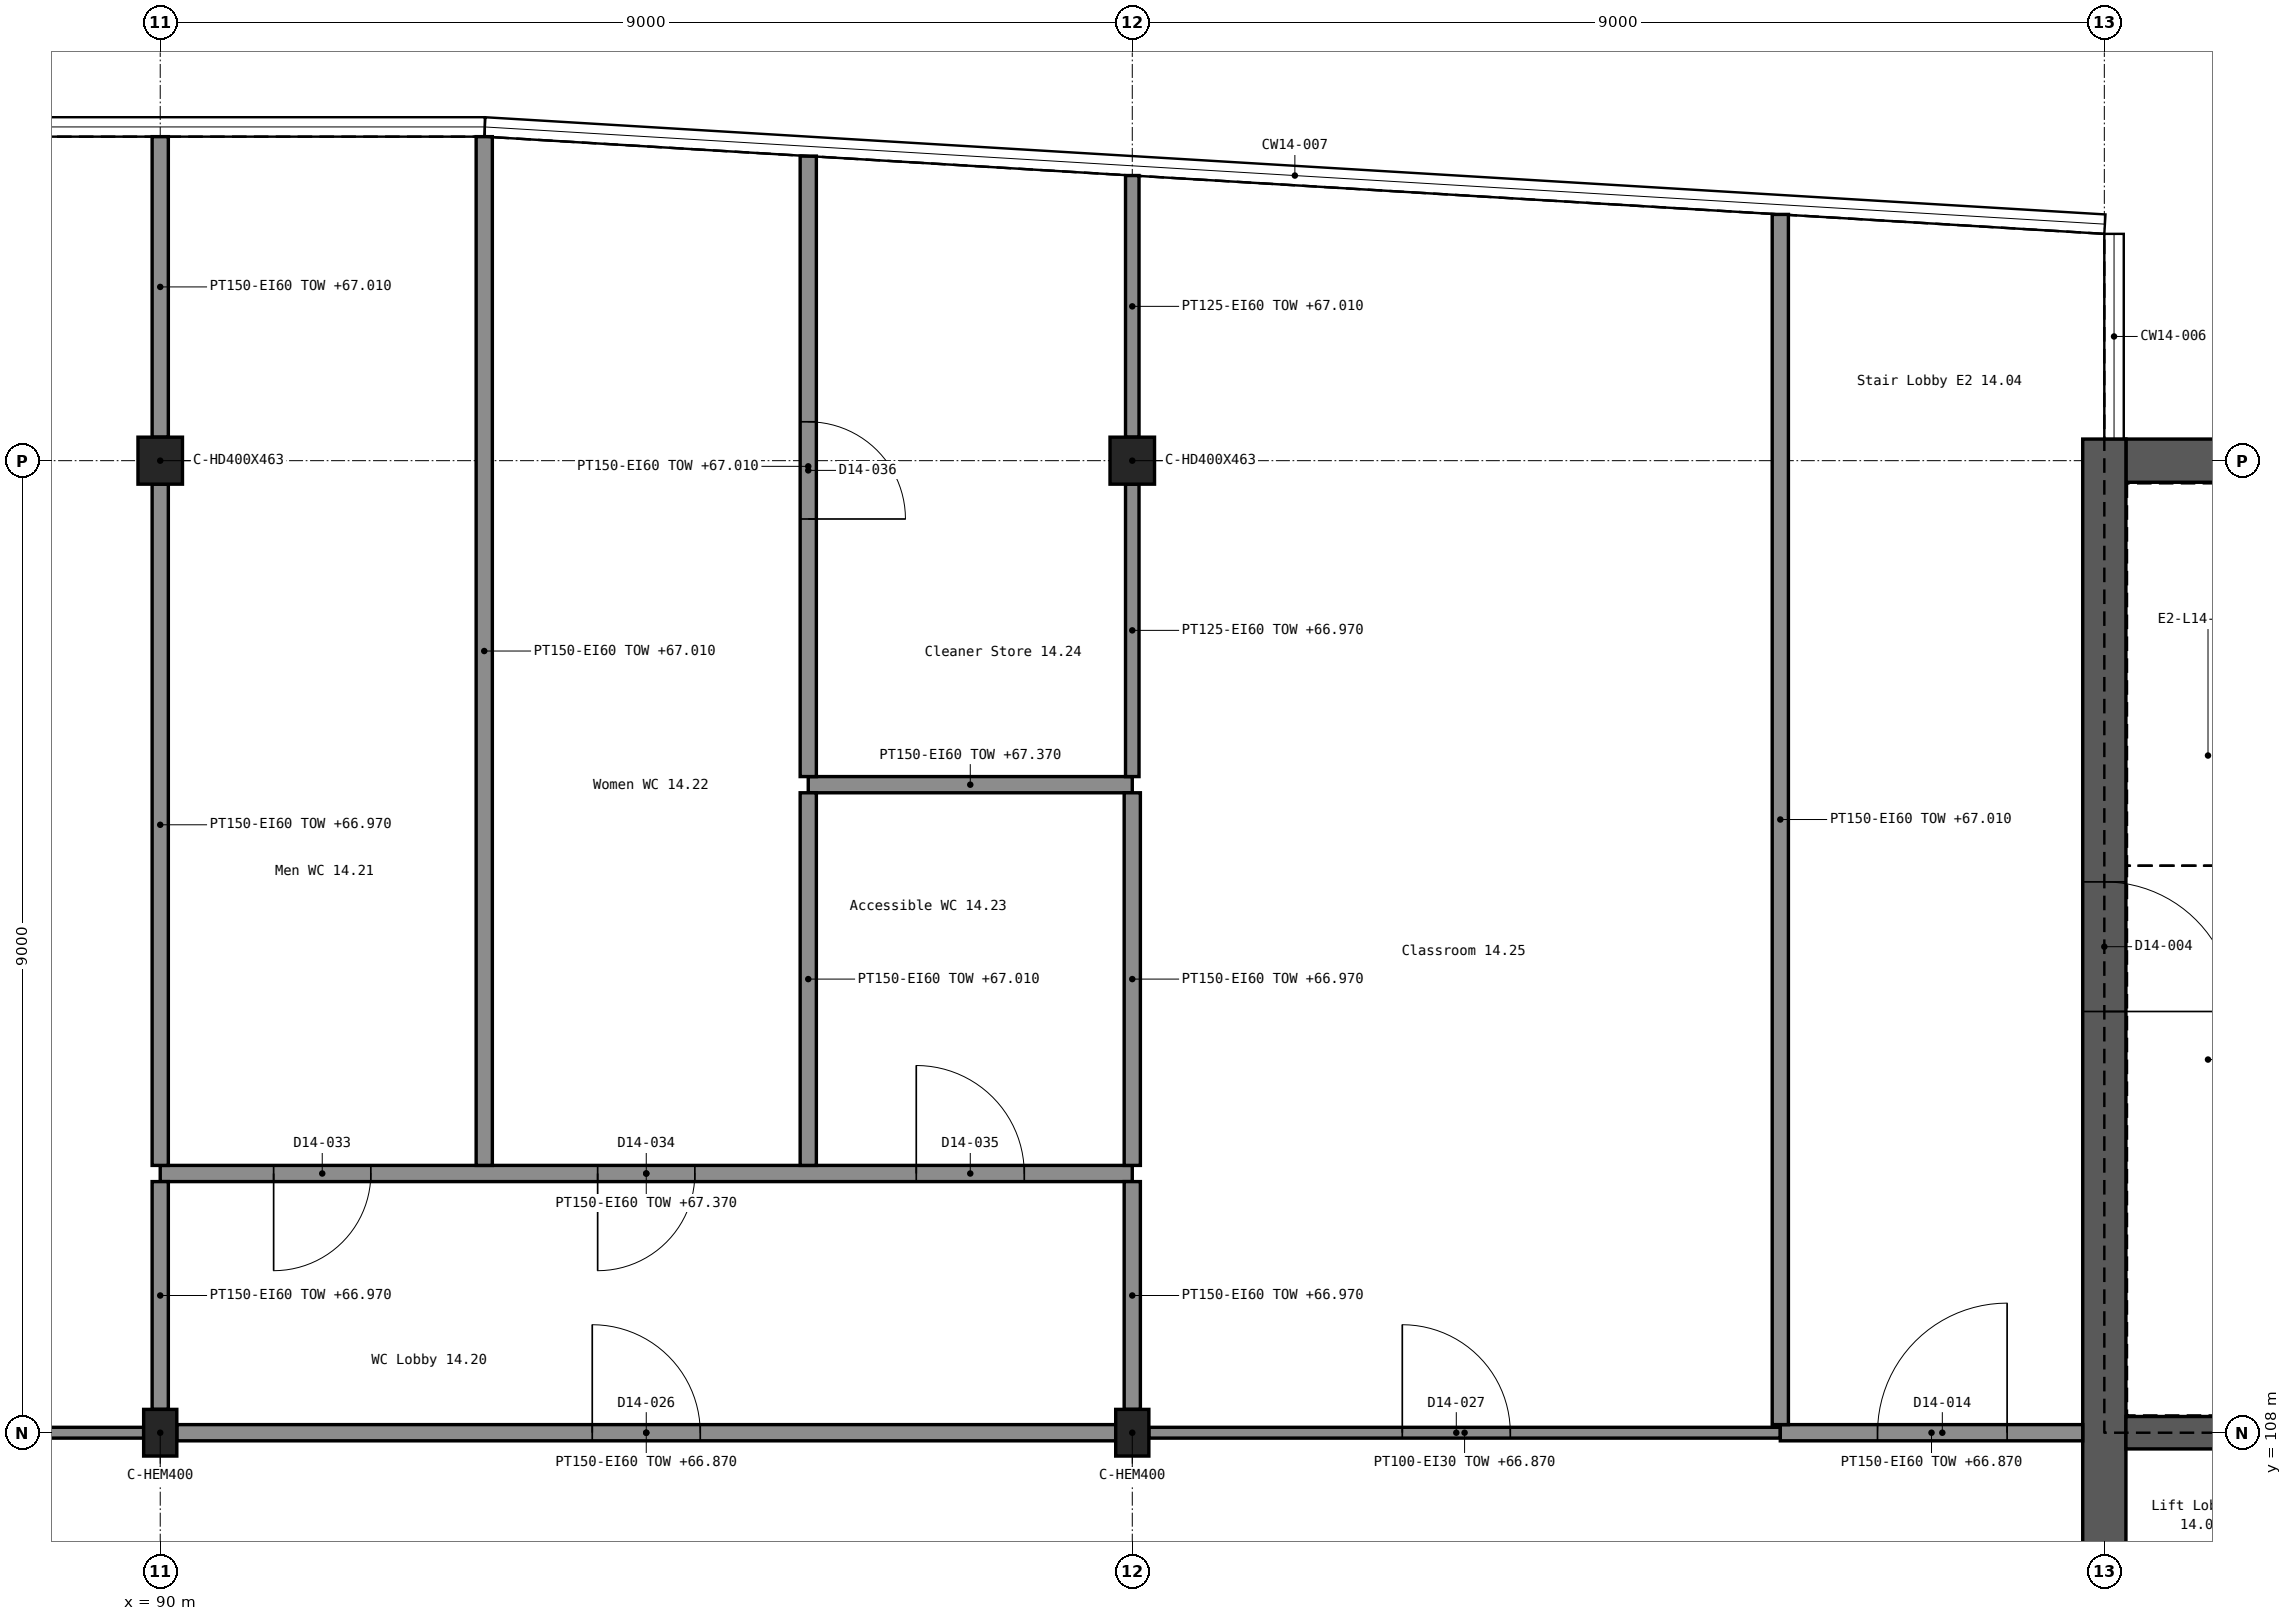
"""IFC4 building model, lengths in metres.
Left out: names, types, materials, properties, quantities, classifications, styles, units other than length and angle.
Written with IfcOpenShell. Run it as: python <this file> out.ifc"""

import sys

from ifc_helpers import new_model, si_unit, direction, frame, frame_2d, origin, origin_2d, place, context, subcontext, project, spatial, rectangle, i_section, extrude, element, fill, save


model = new_model("IFC4")
c1 = context("Model", 3, precision=1e-05, world=origin(), true_north=direction((0.0, 1.0)))
c2 = subcontext(c1, "Body", "Model", "MODEL_VIEW")
j1 = project(units=[si_unit("LENGTHUNIT", "METRE"), si_unit("PLANEANGLEUNIT", "RADIAN")], contexts=[c1])
p1 = place(None, origin())
s1 = spatial("IfcSite", under=j1, at=p1, CompositionType="ELEMENT")
p2 = place(p1, origin())
s2 = spatial("IfcBuilding", under=s1, at=p2, CompositionType="ELEMENT")
p3 = place(p2, frame((0.0, 0.0, 63.6)))
s3 = spatial("IfcBuildingStorey", under=s2, at=p3, CompositionType="ELEMENT", Elevation=63.6)
p4 = place(p3, frame((108.2, 117.0, 0.0), z_axis=(0.0, 0.0, 1.0), x_axis=(1.0, 0.0, 0.0)))
e1 = element("IfcWall", 1, at=p4, inside=s3, PredefinedType="SHEAR", context=c2, shape_type="SweptSolid", body=[
    extrude(rectangle(XDim=8.6, YDim=0.4, at=frame_2d((4.3, 0.0))), origin(), (0.0, 0.0, 1.0), 3.9),
])
p5 = place(p4, frame((4.05, 0.0, 1.2)))
e2 = element("IfcOpeningElement", 2, at=p5, cuts=e1, PredefinedType="OPENING", context=c2, shape_type="SweptSolid", body=[
    extrude(rectangle(XDim=0.9, YDim=1.5, at=frame_2d((0.45, 0.75))), frame((0.0, 0.211, 0.0), z_axis=(0.0, -1.0, 0.0), x_axis=(1.0, 0.0, 0.0)), (0.0, 0.0, 1.0), 0.422),
])
p6 = place(p3, frame((108.0, 89.8, 0.0), z_axis=(0.0, 0.0, 1.0), x_axis=(0.0, 1.0, 0.0)))
e3 = element("IfcWall", 3, at=p6, inside=s3, PredefinedType="SHEAR", context=c2, shape_type="SweptSolid", body=[
    extrude(rectangle(XDim=27.4, YDim=0.4, at=frame_2d((13.7, 0.0))), origin(), (0.0, 0.0, 1.0), 3.9),
])
p7 = place(p6, frame((4.1, 0.0, 0.0)))
e4 = element("IfcOpeningElement", 4, at=p7, cuts=e3, PredefinedType="OPENING", context=c2, shape_type="SweptSolid", body=[
    extrude(rectangle(XDim=1.2, YDim=2.1, at=frame_2d((0.6, 1.05))), frame((0.0, 0.211, 0.0), z_axis=(0.0, -1.0, 0.0), x_axis=(1.0, 0.0, 0.0)), (0.0, 0.0, 1.0), 0.422),
])
p8 = place(p6, frame((22.1, 0.0, 0.0)))
e5 = element("IfcOpeningElement", 5, at=p8, cuts=e3, PredefinedType="OPENING", context=c2, shape_type="SweptSolid", body=[
    extrude(rectangle(XDim=1.2, YDim=2.1, at=frame_2d((0.6, 1.05))), frame((0.0, 0.211, 0.0), z_axis=(0.0, -1.0, 0.0), x_axis=(1.0, 0.0, 0.0)), (0.0, 0.0, 1.0), 0.422),
])
p9 = place(p6, frame((12.5, 0.0, 0.0)))
e6 = element("IfcOpeningElement", 6, at=p9, cuts=e3, PredefinedType="OPENING", context=c2, shape_type="SweptSolid", body=[
    extrude(rectangle(XDim=2.0, YDim=2.1, at=frame_2d((1.0, 1.05))), frame((0.0, 0.211, 0.0), z_axis=(0.0, -1.0, 0.0), x_axis=(1.0, 0.0, 0.0)), (0.0, 0.0, 1.0), 0.422),
])
p10 = place(p3, frame((108.2, 108.0, 0.0), z_axis=(0.0, 0.0, 1.0), x_axis=(1.0, 0.0, 0.0)))
e7 = element("IfcWall", 7, at=p10, inside=s3, PredefinedType="SHEAR", context=c2, shape_type="SweptSolid", body=[
    extrude(rectangle(XDim=8.6, YDim=0.3, at=frame_2d((4.3, 0.0))), origin(), (0.0, 0.0, 1.0), 3.9),
])
for number, where, z_axis, x_axis in (
    (8, (90.0, 108.0, 0.0), (0.0, 0.0, 1.0), (1.0, 0.0, 0.0)),
    (9, (99.0, 108.0, 0.0), (0.0, 0.0, 1.0), (1.0, 0.0, 0.0)),
):
    element("IfcColumn", number, at=place(p3, frame(where, z_axis=z_axis, x_axis=x_axis)), inside=s3, PredefinedType="COLUMN", context=c2, shape_type="SweptSolid", body=[
        extrude(i_section(OverallWidth=0.307, OverallDepth=0.432, WebThickness=0.021, FlangeThickness=0.04, FilletRadius=0.027, at=origin_2d()), origin(), (0.0, 0.0, 1.0), 3.9),
    ])
for number, where, z_axis, x_axis in (
    (10, (90.0, 117.0, 0.0), (0.0, 0.0, 1.0), (1.0, 0.0, 0.0)),
    (11, (99.0, 117.0, 0.0), (0.0, 0.0, 1.0), (1.0, 0.0, 0.0)),
):
    element("IfcColumn", number, at=place(p3, frame(where, z_axis=z_axis, x_axis=x_axis)), inside=s3, PredefinedType="COLUMN", context=c2, shape_type="SweptSolid", body=[
        extrude(i_section(OverallWidth=0.412, OverallDepth=0.435, WebThickness=0.036, FlangeThickness=0.057, FilletRadius=0.015, at=origin_2d()), origin(), (0.0, 0.0, 1.0), 3.9),
    ])
p11 = place(p3, frame((84.0, 108.0, 0.0), z_axis=(0.0, 0.0, 1.0), x_axis=(1.0, 0.0, 0.0)))
e12 = element("IfcWall", 12, at=p11, inside=s3, PredefinedType="PARTITIONING", context=c2, shape_type="SweptSolid", body=[
    extrude(rectangle(XDim=5.846, YDim=0.1, at=frame_2d((2.923, 0.0))), origin(), (0.0, 0.0, 1.0), 3.27),
])
p12 = place(p11, frame((3.375, 0.0, 0.0)))
e13 = element("IfcOpeningElement", 13, at=p12, cuts=e12, PredefinedType="OPENING", context=c2, shape_type="SweptSolid", body=[
    extrude(rectangle(XDim=1.0, YDim=2.1, at=frame_2d((0.5, 1.05))), frame((0.0, 0.061, 0.0), z_axis=(0.0, -1.0, 0.0), x_axis=(1.0, 0.0, 0.0)), (0.0, 0.0, 1.0), 0.122),
])
p13 = place(p3, frame((99.154, 108.0, 0.0), z_axis=(0.0, 0.0, 1.0), x_axis=(1.0, 0.0, 0.0)))
e14 = element("IfcWall", 14, at=p13, inside=s3, PredefinedType="PARTITIONING", context=c2, shape_type="SweptSolid", body=[
    extrude(rectangle(XDim=5.846, YDim=0.1, at=frame_2d((2.923, 0.0))), origin(), (0.0, 0.0, 1.0), 3.27),
])
p14 = place(p13, frame((2.346, 0.0, 0.0)))
e15 = element("IfcOpeningElement", 15, at=p14, cuts=e14, PredefinedType="OPENING", context=c2, shape_type="SweptSolid", body=[
    extrude(rectangle(XDim=1.0, YDim=2.1, at=frame_2d((0.5, 1.05))), frame((0.0, 0.061, 0.0), z_axis=(0.0, -1.0, 0.0), x_axis=(1.0, 0.0, 0.0)), (0.0, 0.0, 1.0), 0.122),
])
p15 = place(p3, frame((90.154, 108.0, 0.0), z_axis=(0.0, 0.0, 1.0), x_axis=(1.0, 0.0, 0.0)))
e16 = element("IfcWall", 16, at=p15, inside=s3, PredefinedType="PARTITIONING", context=c2, shape_type="SweptSolid", body=[
    extrude(rectangle(XDim=8.693, YDim=0.15, at=frame_2d((4.346, 0.0))), origin(), (0.0, 0.0, 1.0), 3.27),
])
p16 = place(p15, frame((3.846, 0.0, 0.0)))
e17 = element("IfcOpeningElement", 17, at=p16, cuts=e16, PredefinedType="OPENING", context=c2, shape_type="SweptSolid", body=[
    extrude(rectangle(XDim=1.0, YDim=2.1, at=frame_2d((0.5, 1.05))), frame((0.0, 0.086, 0.0), z_axis=(0.0, -1.0, 0.0), x_axis=(1.0, 0.0, 0.0)), (0.0, 0.0, 1.0), 0.172),
])
p17 = place(p3, frame((105.0, 108.0, 0.0), z_axis=(0.0, 0.0, 1.0), x_axis=(1.0, 0.0, 0.0)))
e18 = element("IfcWall", 18, at=p17, inside=s3, PredefinedType="PARTITIONING", context=c2, shape_type="SweptSolid", body=[
    extrude(rectangle(XDim=2.8, YDim=0.15, at=frame_2d((1.4, 0.0))), origin(), (0.0, 0.0, 1.0), 3.27),
])
p18 = place(p17, frame((0.9, 0.0, 0.0)))
e19 = element("IfcOpeningElement", 19, at=p18, cuts=e18, PredefinedType="OPENING", context=c2, shape_type="SweptSolid", body=[
    extrude(rectangle(XDim=1.2, YDim=2.1, at=frame_2d((0.6, 1.05))), frame((0.0, 0.086, 0.0), z_axis=(0.0, -1.0, 0.0), x_axis=(1.0, 0.0, 0.0)), (0.0, 0.0, 1.0), 0.172),
])
p19 = place(p3, frame((90.0, 110.4, 0.0), z_axis=(0.0, 0.0, 1.0), x_axis=(1.0, 0.0, 0.0)))
e20 = element("IfcWall", 20, at=p19, inside=s3, PredefinedType="PARTITIONING", context=c2, shape_type="SweptSolid", body=[
    extrude(rectangle(XDim=9.0, YDim=0.15, at=frame_2d((4.5, 0.0))), origin(), (0.0, 0.0, 1.0), 3.77),
])
p20 = place(p19, frame((1.05, 0.0, 0.0)))
e21 = element("IfcOpeningElement", 21, at=p20, cuts=e20, PredefinedType="OPENING", context=c2, shape_type="SweptSolid", body=[
    extrude(rectangle(XDim=0.9, YDim=2.1, at=frame_2d((0.45, 1.05))), frame((0.0, 0.086, 0.0), z_axis=(0.0, -1.0, 0.0), x_axis=(1.0, 0.0, 0.0)), (0.0, 0.0, 1.0), 0.172),
])
p21 = place(p19, frame((4.05, 0.0, 0.0)))
e22 = element("IfcOpeningElement", 22, at=p21, cuts=e20, PredefinedType="OPENING", context=c2, shape_type="SweptSolid", body=[
    extrude(rectangle(XDim=0.9, YDim=2.1, at=frame_2d((0.45, 1.05))), frame((0.0, 0.086, 0.0), z_axis=(0.0, -1.0, 0.0), x_axis=(1.0, 0.0, 0.0)), (0.0, 0.0, 1.0), 0.172),
])
p22 = place(p19, frame((7.0, 0.0, 0.0)))
e23 = element("IfcOpeningElement", 23, at=p22, cuts=e20, PredefinedType="OPENING", context=c2, shape_type="SweptSolid", body=[
    extrude(rectangle(XDim=1.0, YDim=2.1, at=frame_2d((0.5, 1.05))), frame((0.0, 0.086, 0.0), z_axis=(0.0, -1.0, 0.0), x_axis=(1.0, 0.0, 0.0)), (0.0, 0.0, 1.0), 0.172),
])
p23 = place(p3, frame((96.0, 114.0, 0.0), z_axis=(0.0, 0.0, 1.0), x_axis=(1.0, 0.0, 0.0)))
e24 = element("IfcWall", 24, at=p23, inside=s3, PredefinedType="PARTITIONING", context=c2, shape_type="SweptSolid", body=[
    extrude(rectangle(XDim=3.0, YDim=0.15, at=frame_2d((1.5, 0.0))), origin(), (0.0, 0.0, 1.0), 3.77),
])
p24 = place(p3, frame((90.0, 108.216, 0.0), z_axis=(0.0, 0.0, 1.0), x_axis=(0.0, 1.0, 0.0)))
e25 = element("IfcWall", 25, at=p24, inside=s3, PredefinedType="PARTITIONING", context=c2, shape_type="SweptSolid", body=[
    extrude(rectangle(XDim=2.109, YDim=0.15, at=frame_2d((1.054, 0.0))), origin(), (0.0, 0.0, 1.0), 3.37),
])
p25 = place(p3, frame((90.0, 110.475, 0.0), z_axis=(0.0, 0.0, 1.0), x_axis=(0.0, 1.0, 0.0)))
e26 = element("IfcWall", 26, at=p25, inside=s3, PredefinedType="PARTITIONING", context=c2, shape_type="SweptSolid", body=[
    extrude(rectangle(XDim=6.307, YDim=0.15, at=frame_2d((3.154, 0.0))), origin(), (0.0, 0.0, 1.0), 3.37),
])
p26 = place(p3, frame((90.0, 117.218, 0.0), z_axis=(0.0, 0.0, 1.0), x_axis=(0.0, 1.0, 0.0)))
e27 = element("IfcWall", 27, at=p26, inside=s3, PredefinedType="PARTITIONING", context=c2, shape_type="SweptSolid", body=[
    extrude(rectangle(XDim=2.782, YDim=0.15, at=frame_2d((1.391, 0.0))), origin(), (0.0, 0.0, 1.0), 3.41),
])
p27 = place(p3, frame((93.0, 110.475, 0.0), z_axis=(0.0, 0.0, 1.0), x_axis=(0.0, 1.0, 0.0)))
e28 = element("IfcWall", 28, at=p27, inside=s3, PredefinedType="PARTITIONING", context=c2, shape_type="SweptSolid", body=[
    extrude(rectangle(XDim=9.525, YDim=0.15, at=frame_2d((4.762, 0.0))), origin(), (0.0, 0.0, 1.0), 3.41),
])
p28 = place(p3, frame((96.0, 110.475, 0.0), z_axis=(0.0, 0.0, 1.0), x_axis=(0.0, 1.0, 0.0)))
e29 = element("IfcWall", 29, at=p28, inside=s3, PredefinedType="PARTITIONING", context=c2, shape_type="SweptSolid", body=[
    extrude(rectangle(XDim=3.45, YDim=0.15, at=frame_2d((1.725, 0.0))), origin(), (0.0, 0.0, 1.0), 3.41),
])
p29 = place(p3, frame((96.0, 114.075, 0.0), z_axis=(0.0, 0.0, 1.0), x_axis=(0.0, 1.0, 0.0)))
e30 = element("IfcWall", 30, at=p29, inside=s3, PredefinedType="PARTITIONING", context=c2, shape_type="SweptSolid", body=[
    extrude(rectangle(XDim=5.745, YDim=0.15, at=frame_2d((2.873, 0.0))), origin(), (0.0, 0.0, 1.0), 3.41),
])
p30 = place(p29, frame((2.385, 0.0, 0.0)))
e31 = element("IfcOpeningElement", 31, at=p30, cuts=e30, PredefinedType="OPENING", context=c2, shape_type="SweptSolid", body=[
    extrude(rectangle(XDim=0.9, YDim=2.1, at=frame_2d((0.45, 1.05))), frame((0.0, 0.086, 0.0), z_axis=(0.0, -1.0, 0.0), x_axis=(1.0, 0.0, 0.0)), (0.0, 0.0, 1.0), 0.172),
])
p31 = place(p3, frame((99.0, 114.075, 0.0), z_axis=(0.0, 0.0, 1.0), x_axis=(0.0, 1.0, 0.0)))
e32 = element("IfcWall", 32, at=p31, inside=s3, PredefinedType="PARTITIONING", context=c2, shape_type="SweptSolid", body=[
    extrude(rectangle(XDim=2.708, YDim=0.125, at=frame_2d((1.354, 0.0))), origin(), (0.0, 0.0, 1.0), 3.37),
])
p32 = place(p3, frame((99.0, 117.218, 0.0), z_axis=(0.0, 0.0, 1.0), x_axis=(0.0, 1.0, 0.0)))
e33 = element("IfcWall", 33, at=p32, inside=s3, PredefinedType="PARTITIONING", context=c2, shape_type="SweptSolid", body=[
    extrude(rectangle(XDim=2.422, YDim=0.125, at=frame_2d((1.211, 0.0))), origin(), (0.0, 0.0, 1.0), 3.41),
])
p33 = place(p3, frame((99.0, 108.216, 0.0), z_axis=(0.0, 0.0, 1.0), x_axis=(0.0, 1.0, 0.0)))
e34 = element("IfcWall", 34, at=p33, inside=s3, PredefinedType="PARTITIONING", context=c2, shape_type="SweptSolid", body=[
    extrude(rectangle(XDim=2.109, YDim=0.15, at=frame_2d((1.054, 0.0))), origin(), (0.0, 0.0, 1.0), 3.37),
])
p34 = place(p3, frame((99.0, 110.475, 0.0), z_axis=(0.0, 0.0, 1.0), x_axis=(0.0, 1.0, 0.0)))
e35 = element("IfcWall", 35, at=p34, inside=s3, PredefinedType="PARTITIONING", context=c2, shape_type="SweptSolid", body=[
    extrude(rectangle(XDim=3.45, YDim=0.15, at=frame_2d((1.725, 0.0))), origin(), (0.0, 0.0, 1.0), 3.37),
])
p35 = place(p3, frame((105.0, 108.075, 0.0), z_axis=(0.0, 0.0, 1.0), x_axis=(0.0, 1.0, 0.0)))
e36 = element("IfcWall", 36, at=p35, inside=s3, PredefinedType="PARTITIONING", context=c2, shape_type="SweptSolid", body=[
    extrude(rectangle(XDim=11.205, YDim=0.15, at=frame_2d((5.603, 0.0))), origin(), (0.0, 0.0, 1.0), 3.41),
])
p36 = place(p8, frame((1.2, 0.0, 0.0), z_axis=(0.0, 0.0, 1.0), x_axis=(-1.0, 0.0, 0.0)))
e37 = element("IfcDoor", 37, at=p36, inside=s3, OperationType="SINGLE_SWING_RIGHT", PredefinedType="DOOR", context=c2, shape_type="SweptSolid", body=[
    extrude(rectangle(XDim=1.2, YDim=2.1, at=frame_2d((0.6, 1.05))), frame((0.0, 0.025, 0.0), z_axis=(0.0, -1.0, 0.0), x_axis=(1.0, 0.0, 0.0)), (0.0, 0.0, 1.0), 0.05),
])
fill(e5, e37)
p37 = place(p18, origin())
e38 = element("IfcDoor", 38, at=p37, inside=s3, OperationType="SINGLE_SWING_RIGHT", PredefinedType="DOOR", context=c2, shape_type="SweptSolid", body=[
    extrude(rectangle(XDim=1.2, YDim=2.1, at=frame_2d((0.6, 1.05))), frame((0.0, 0.025, 0.0), z_axis=(0.0, -1.0, 0.0), x_axis=(1.0, 0.0, 0.0)), (0.0, 0.0, 1.0), 0.05),
])
fill(e19, e38)
p38 = place(p16, origin())
e39 = element("IfcDoor", 39, at=p38, inside=s3, OperationType="SINGLE_SWING_LEFT", PredefinedType="DOOR", context=c2, shape_type="SweptSolid", body=[
    extrude(rectangle(XDim=1.0, YDim=2.1, at=frame_2d((0.5, 1.05))), frame((0.0, 0.025, 0.0), z_axis=(0.0, -1.0, 0.0), x_axis=(1.0, 0.0, 0.0)), (0.0, 0.0, 1.0), 0.05),
])
fill(e17, e39)
p39 = place(p14, origin())
e40 = element("IfcDoor", 40, at=p39, inside=s3, OperationType="SINGLE_SWING_LEFT", PredefinedType="DOOR", context=c2, shape_type="SweptSolid", body=[
    extrude(rectangle(XDim=1.0, YDim=2.1, at=frame_2d((0.5, 1.05))), frame((0.0, 0.025, 0.0), z_axis=(0.0, -1.0, 0.0), x_axis=(1.0, 0.0, 0.0)), (0.0, 0.0, 1.0), 0.05),
])
fill(e15, e40)
p40 = place(p20, frame((0.9, 0.0, 0.0), z_axis=(0.0, 0.0, 1.0), x_axis=(-1.0, 0.0, 0.0)))
e41 = element("IfcDoor", 41, at=p40, inside=s3, OperationType="SINGLE_SWING_RIGHT", PredefinedType="DOOR", context=c2, shape_type="SweptSolid", body=[
    extrude(rectangle(XDim=0.9, YDim=2.1, at=frame_2d((0.45, 1.05))), frame((0.0, 0.025, 0.0), z_axis=(0.0, -1.0, 0.0), x_axis=(1.0, 0.0, 0.0)), (0.0, 0.0, 1.0), 0.05),
])
fill(e21, e41)
p41 = place(p21, frame((0.9, 0.0, 0.0), z_axis=(0.0, 0.0, 1.0), x_axis=(-1.0, 0.0, 0.0)))
e42 = element("IfcDoor", 42, at=p41, inside=s3, OperationType="SINGLE_SWING_RIGHT", PredefinedType="DOOR", context=c2, shape_type="SweptSolid", body=[
    extrude(rectangle(XDim=0.9, YDim=2.1, at=frame_2d((0.45, 1.05))), frame((0.0, 0.025, 0.0), z_axis=(0.0, -1.0, 0.0), x_axis=(1.0, 0.0, 0.0)), (0.0, 0.0, 1.0), 0.05),
])
fill(e22, e42)
p42 = place(p22, origin())
e43 = element("IfcDoor", 43, at=p42, inside=s3, OperationType="SINGLE_SWING_LEFT", PredefinedType="DOOR", context=c2, shape_type="SweptSolid", body=[
    extrude(rectangle(XDim=1.0, YDim=2.1, at=frame_2d((0.5, 1.05))), frame((0.0, 0.025, 0.0), z_axis=(0.0, -1.0, 0.0), x_axis=(1.0, 0.0, 0.0)), (0.0, 0.0, 1.0), 0.05),
])
fill(e23, e43)
p43 = place(p30, frame((0.9, 0.0, 0.0), z_axis=(0.0, 0.0, 1.0), x_axis=(-1.0, 0.0, 0.0)))
e44 = element("IfcDoor", 44, at=p43, inside=s3, OperationType="SINGLE_SWING_RIGHT", PredefinedType="DOOR", context=c2, shape_type="SweptSolid", body=[
    extrude(rectangle(XDim=0.9, YDim=2.1, at=frame_2d((0.45, 1.05))), frame((0.0, 0.025, 0.0), z_axis=(0.0, -1.0, 0.0), x_axis=(1.0, 0.0, 0.0)), (0.0, 0.0, 1.0), 0.05),
])
fill(e31, e44)
save(model, sys.argv[1])
